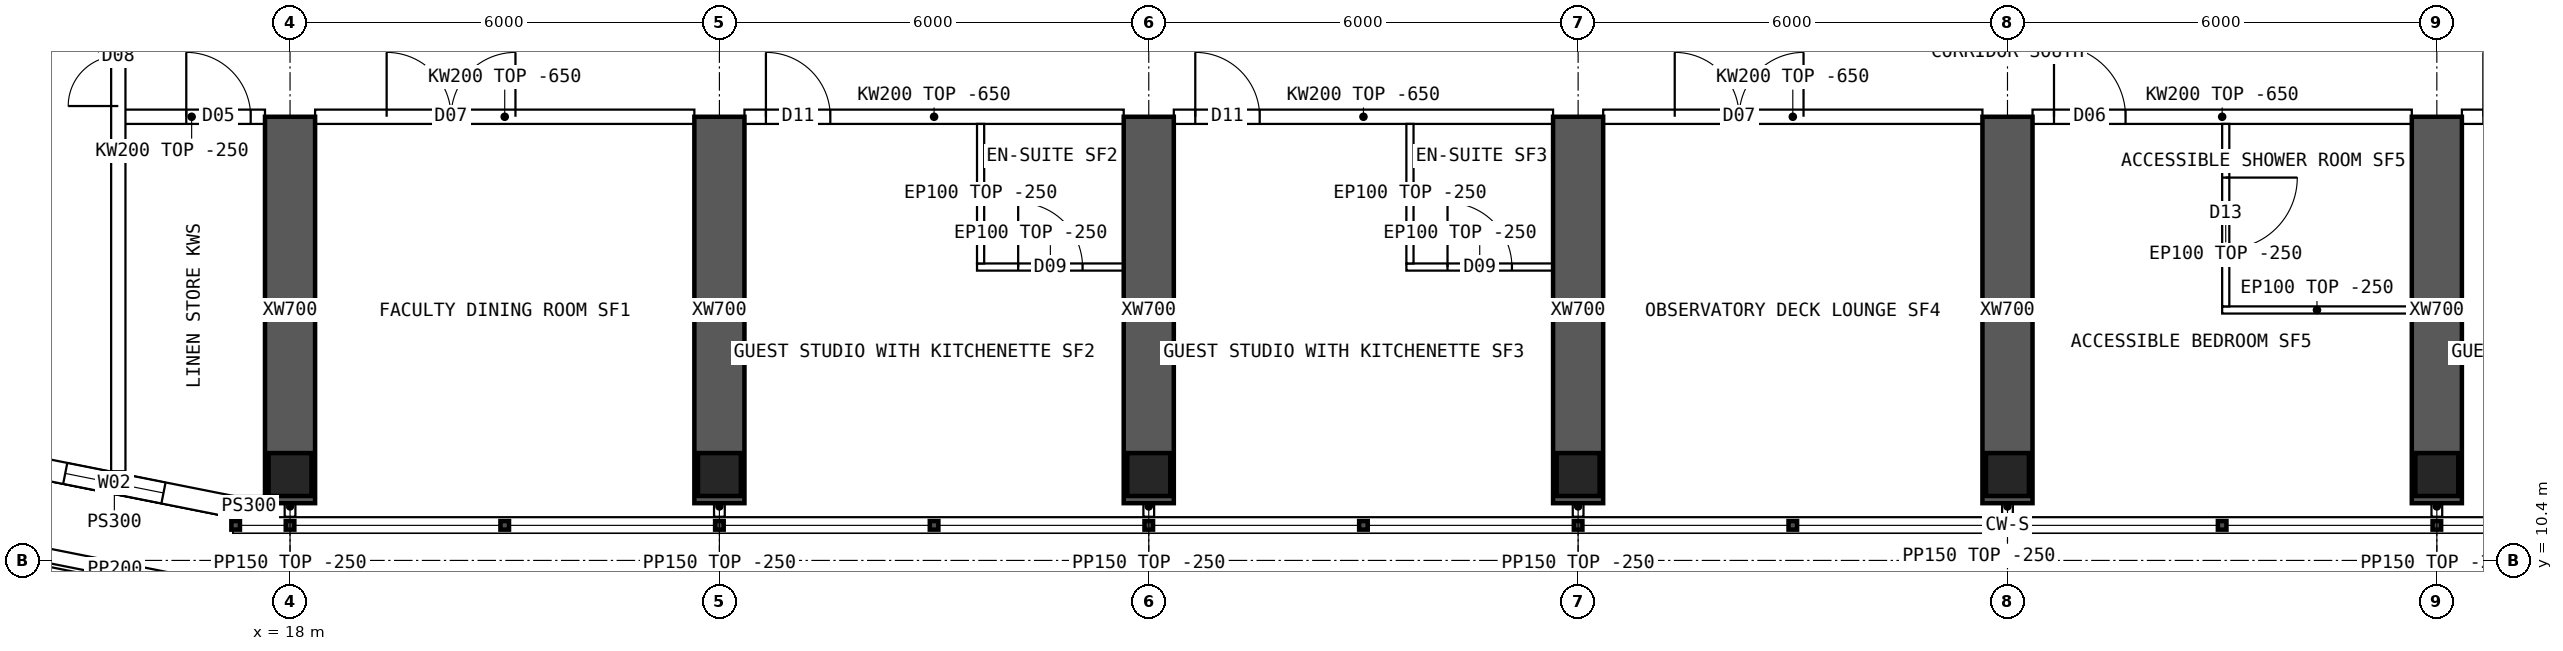
"""IFC4 building model, lengths in metres.
Left out: names, types, materials, properties, quantities, classifications, styles, units other than length and angle.
Written with IfcOpenShell. Run it as: python <this file> out.ifc"""

import sys

from ifc_helpers import new_model, si_unit, direction, frame, frame_2d, origin, origin_2d, place, context, subcontext, project, spatial, polyline, rectangle, hollow_rectangle, outline, extrude, element, fill, save


model = new_model("IFC4")
c1 = context("Model", 3, precision=1e-05, world=origin(), true_north=direction((0.0, 1.0)))
c2 = subcontext(c1, "Body", "Model", "MODEL_VIEW")
j1 = project(units=[si_unit("LENGTHUNIT", "METRE"), si_unit("PLANEANGLEUNIT", "RADIAN")], contexts=[c1])
p1 = place(None, origin())
s1 = spatial("IfcSite", under=j1, at=p1, CompositionType="ELEMENT")
p2 = place(p1, origin())
s2 = spatial("IfcBuilding", under=s1, at=p2, CompositionType="ELEMENT")
p3 = place(p2, frame((0.0, 0.0, 208.3)))
s3 = spatial("IfcBuildingStorey", under=s2, at=p3, CompositionType="ELEMENT", Elevation=208.3)
for number, where, z_axis, x_axis in (
    (1, (18.0, 11.6, 0.0), (0.0, 0.0, 1.0), (1.0, 0.0, 0.0)),
    (2, (24.0, 11.6, 0.0), (0.0, 0.0, 1.0), (1.0, 0.0, 0.0)),
    (3, (30.0, 11.6, 0.0), (0.0, 0.0, 1.0), (1.0, 0.0, 0.0)),
    (4, (36.0, 11.6, 0.0), (0.0, 0.0, 1.0), (1.0, 0.0, 0.0)),
    (5, (42.0, 11.6, 0.0), (0.0, 0.0, 1.0), (1.0, 0.0, 0.0)),
    (6, (48.0, 11.6, 0.0), (0.0, 0.0, 1.0), (1.0, 0.0, 0.0)),
):
    element("IfcColumn", number, at=place(p3, frame(where, z_axis=z_axis, x_axis=x_axis)), inside=s3, PredefinedType="COLUMN", context=c2, shape_type="SweptSolid", body=[
        extrude(hollow_rectangle(XDim=0.6, YDim=0.6, WallThickness=0.06, at=origin_2d()), origin(), (0.0, 0.0, 1.0), 4.5),
    ])
for number, where, z_axis, x_axis in (
    (7, (18.0, 11.2, 0.0), (0.0, 0.0, 1.0), (0.0, 1.0, 0.0)),
    (8, (24.0, 11.2, 0.0), (0.0, 0.0, 1.0), (0.0, 1.0, 0.0)),
    (9, (30.0, 11.2, 0.0), (0.0, 0.0, 1.0), (0.0, 1.0, 0.0)),
    (10, (36.0, 11.2, 0.0), (0.0, 0.0, 1.0), (0.0, 1.0, 0.0)),
    (11, (42.0, 11.2, 0.0), (0.0, 0.0, 1.0), (0.0, 1.0, 0.0)),
    (12, (48.0, 11.2, 0.0), (0.0, 0.0, 1.0), (0.0, 1.0, 0.0)),
):
    element("IfcWall", number, at=place(p3, frame(where, z_axis=z_axis, x_axis=x_axis)), inside=s3, PredefinedType="SHEAR", context=c2, shape_type="SweptSolid", body=[
        extrude(rectangle(XDim=5.4, YDim=0.7, at=frame_2d((2.7, 0.0))), origin(), (0.0, 0.0, 1.0), 4.5),
    ])
p4 = place(p3, frame((13.89, 11.808, 0.0), z_axis=(0.0, 0.0, 1.0), x_axis=(0.98078325777, -0.195100490205, 0.0)))
e13 = element("IfcWall", 13, at=p4, inside=s3, PredefinedType="SOLIDWALL", context=c2, shape_type="SweptSolid", body=[
    extrude(outline(polyline([(-0.03, -0.15), (3.405, -0.15), (3.345, 0.15), (0.03, 0.15), (-0.03, -0.15)])), origin(), (0.0, 0.0, 1.0), 4.25),
])
p5 = place(p4, frame((0.988, 0.0, 0.9)))
e14 = element("IfcOpeningElement", 14, at=p5, cuts=e13, PredefinedType="OPENING", context=c2, shape_type="SweptSolid", body=[
    extrude(rectangle(XDim=1.4, YDim=1.8, at=frame_2d((0.7, 0.9))), frame((0.0, 0.16, 0.0), z_axis=(0.0, -1.0, 0.0), x_axis=(1.0, 0.0, 0.0)), (0.0, 0.0, 1.0), 0.32),
])
p6 = place(p3, frame((17.2, 11.15, 0.0), z_axis=(0.0, 0.0, 1.0), x_axis=(1.0, 0.0, 0.0)))
e15 = element("IfcWall", 15, at=p6, inside=s3, PredefinedType="SOLIDWALL", context=c2, shape_type="SweptSolid", body=[
    extrude(rectangle(XDim=0.45, YDim=0.3, at=frame_2d((0.225, 0.0))), origin(), (0.0, 0.0, 1.0), 4.25),
])
p7 = place(p3, frame((17.215, 9.95, 0.0), z_axis=(0.0, 0.0, 1.0), x_axis=(-0.980787925163, 0.195077025438, 0.0)))
e16 = element("IfcWall", 16, at=p7, inside=s3, PredefinedType="PARAPET", context=c2, shape_type="SweptSolid", body=[
    extrude(rectangle(XDim=3.389, YDim=0.2, at=frame_2d((1.695, 0.0))), origin(), (0.0, 0.0, 1.0), 1.1),
])
p8 = place(p3, frame((15.6, 16.6, 0.0), z_axis=(0.0, 0.0, 1.0), x_axis=(1.0, 0.0, 0.0)))
e17 = element("IfcWall", 17, at=p8, inside=s3, PredefinedType="SOLIDWALL", context=c2, shape_type="SweptSolid", body=[
    extrude(rectangle(XDim=2.05, YDim=0.2, at=frame_2d((1.025, 0.0))), origin(), (0.0, 0.0, 1.0), 4.25),
])
p9 = place(p8, frame((0.95, 0.0, 0.0)))
e18 = element("IfcOpeningElement", 18, at=p9, cuts=e17, PredefinedType="OPENING", context=c2, shape_type="SweptSolid", body=[
    extrude(rectangle(XDim=0.9, YDim=2.1, at=frame_2d((0.45, 1.05))), frame((0.0, 0.11, 0.0), z_axis=(0.0, -1.0, 0.0), x_axis=(1.0, 0.0, 0.0)), (0.0, 0.0, 1.0), 0.22),
])
p10 = place(p3, frame((18.35, 16.6, 0.0), z_axis=(0.0, 0.0, 1.0), x_axis=(1.0, 0.0, 0.0)))
e19 = element("IfcWall", 19, at=p10, inside=s3, PredefinedType="SOLIDWALL", context=c2, shape_type="SweptSolid", body=[
    extrude(outline(polyline([(0.0, 0.0), (5.3, 0.0), (5.3, 3.85), (0.0, 3.85), (0.0, 0.0)])), frame((0.0, 0.1, 0.0), z_axis=(0.0, -1.0, 0.0), x_axis=(1.0, 0.0, 0.0)), (0.0, 0.0, 1.0), 0.2),
])
p11 = place(p10, frame((1.0, 0.0, 0.0)))
e20 = element("IfcOpeningElement", 20, at=p11, cuts=e19, PredefinedType="OPENING", context=c2, shape_type="SweptSolid", body=[
    extrude(rectangle(XDim=1.8, YDim=2.1, at=frame_2d((0.9, 1.05))), frame((0.0, 0.11, 0.0), z_axis=(0.0, -1.0, 0.0), x_axis=(1.0, 0.0, 0.0)), (0.0, 0.0, 1.0), 0.22),
])
p12 = place(p3, frame((24.35, 16.6, 0.0), z_axis=(0.0, 0.0, 1.0), x_axis=(1.0, 0.0, 0.0)))
e21 = element("IfcWall", 21, at=p12, inside=s3, PredefinedType="SOLIDWALL", context=c2, shape_type="SweptSolid", body=[
    extrude(outline(polyline([(0.0, 0.0), (5.3, 0.0), (5.3, 3.85), (0.0, 3.85), (0.0, 0.0)])), frame((0.0, 0.1, 0.0), z_axis=(0.0, -1.0, 0.0), x_axis=(1.0, 0.0, 0.0)), (0.0, 0.0, 1.0), 0.2),
])
p13 = place(p12, frame((0.3, 0.0, 0.0)))
e22 = element("IfcOpeningElement", 22, at=p13, cuts=e21, PredefinedType="OPENING", context=c2, shape_type="SweptSolid", body=[
    extrude(rectangle(XDim=0.9, YDim=2.1, at=frame_2d((0.45, 1.05))), frame((0.0, 0.11, 0.0), z_axis=(0.0, -1.0, 0.0), x_axis=(1.0, 0.0, 0.0)), (0.0, 0.0, 1.0), 0.22),
])
p14 = place(p3, frame((30.35, 16.6, 0.0), z_axis=(0.0, 0.0, 1.0), x_axis=(1.0, 0.0, 0.0)))
e23 = element("IfcWall", 23, at=p14, inside=s3, PredefinedType="SOLIDWALL", context=c2, shape_type="SweptSolid", body=[
    extrude(outline(polyline([(0.0, 0.0), (5.3, 0.0), (5.3, 3.85), (0.0, 3.85), (0.0, 0.0)])), frame((0.0, 0.1, 0.0), z_axis=(0.0, -1.0, 0.0), x_axis=(1.0, 0.0, 0.0)), (0.0, 0.0, 1.0), 0.2),
])
p15 = place(p14, frame((0.3, 0.0, 0.0)))
e24 = element("IfcOpeningElement", 24, at=p15, cuts=e23, PredefinedType="OPENING", context=c2, shape_type="SweptSolid", body=[
    extrude(rectangle(XDim=0.9, YDim=2.1, at=frame_2d((0.45, 1.05))), frame((0.0, 0.11, 0.0), z_axis=(0.0, -1.0, 0.0), x_axis=(1.0, 0.0, 0.0)), (0.0, 0.0, 1.0), 0.22),
])
p16 = place(p3, frame((36.35, 16.6, 0.0), z_axis=(0.0, 0.0, 1.0), x_axis=(1.0, 0.0, 0.0)))
e25 = element("IfcWall", 25, at=p16, inside=s3, PredefinedType="SOLIDWALL", context=c2, shape_type="SweptSolid", body=[
    extrude(outline(polyline([(0.0, 0.0), (5.3, 0.0), (5.3, 3.85), (0.0, 3.85), (0.0, 0.0)])), frame((0.0, 0.1, 0.0), z_axis=(0.0, -1.0, 0.0), x_axis=(1.0, 0.0, 0.0)), (0.0, 0.0, 1.0), 0.2),
])
p17 = place(p16, frame((1.0, 0.0, 0.0)))
e26 = element("IfcOpeningElement", 26, at=p17, cuts=e25, PredefinedType="OPENING", context=c2, shape_type="SweptSolid", body=[
    extrude(rectangle(XDim=1.8, YDim=2.1, at=frame_2d((0.9, 1.05))), frame((0.0, 0.11, 0.0), z_axis=(0.0, -1.0, 0.0), x_axis=(1.0, 0.0, 0.0)), (0.0, 0.0, 1.0), 0.22),
])
p18 = place(p3, frame((42.35, 16.6, 0.0), z_axis=(0.0, 0.0, 1.0), x_axis=(1.0, 0.0, 0.0)))
e27 = element("IfcWall", 27, at=p18, inside=s3, PredefinedType="SOLIDWALL", context=c2, shape_type="SweptSolid", body=[
    extrude(outline(polyline([(0.0, 0.0), (5.3, 0.0), (5.3, 3.85), (0.0, 3.85), (0.0, 0.0)])), frame((0.0, 0.1, 0.0), z_axis=(0.0, -1.0, 0.0), x_axis=(1.0, 0.0, 0.0)), (0.0, 0.0, 1.0), 0.2),
])
p19 = place(p18, frame((0.3, 0.0, 0.0)))
e28 = element("IfcOpeningElement", 28, at=p19, cuts=e27, PredefinedType="OPENING", context=c2, shape_type="SweptSolid", body=[
    extrude(rectangle(XDim=1.0, YDim=2.1, at=frame_2d((0.5, 1.05))), frame((0.0, 0.11, 0.0), z_axis=(0.0, -1.0, 0.0), x_axis=(1.0, 0.0, 0.0)), (0.0, 0.0, 1.0), 0.22),
])
p20 = place(p3, frame((48.35, 16.6, 0.0), z_axis=(0.0, 0.0, 1.0), x_axis=(1.0, 0.0, 0.0)))
e29 = element("IfcWall", 29, at=p20, inside=s3, PredefinedType="SOLIDWALL", context=c2, shape_type="SweptSolid", body=[
    extrude(outline(polyline([(0.0, 0.0), (5.3, 0.0), (5.3, 3.85), (0.0, 3.85), (0.0, 0.0)])), frame((0.0, 0.1, 0.0), z_axis=(0.0, -1.0, 0.0), x_axis=(1.0, 0.0, 0.0)), (0.0, 0.0, 1.0), 0.2),
])
p21 = place(p20, frame((0.3, 0.0, 0.0)))
e30 = element("IfcOpeningElement", 30, at=p21, cuts=e29, PredefinedType="OPENING", context=c2, shape_type="SweptSolid", body=[
    extrude(rectangle(XDim=0.9, YDim=2.1, at=frame_2d((0.45, 1.05))), frame((0.0, 0.11, 0.0), z_axis=(0.0, -1.0, 0.0), x_axis=(1.0, 0.0, 0.0)), (0.0, 0.0, 1.0), 0.22),
])
p22 = place(p3, frame((29.65, 14.5, 0.0), z_axis=(0.0, 0.0, 1.0), x_axis=(-1.0, 0.0, 0.0)))
e31 = element("IfcWall", 31, at=p22, inside=s3, PredefinedType="PARTITIONING", context=c2, shape_type="SweptSolid", body=[
    extrude(rectangle(XDim=2.05, YDim=0.1, at=frame_2d((1.025, 0.0))), origin(), (0.0, 0.0, 1.0), 4.25),
])
p23 = place(p22, frame((0.575, 0.0, 0.0)))
e32 = element("IfcOpeningElement", 32, at=p23, cuts=e31, PredefinedType="OPENING", context=c2, shape_type="SweptSolid", body=[
    extrude(rectangle(XDim=0.9, YDim=2.1, at=frame_2d((0.45, 1.05))), frame((0.0, 0.06, 0.0), z_axis=(0.0, -1.0, 0.0), x_axis=(1.0, 0.0, 0.0)), (0.0, 0.0, 1.0), 0.12),
])
p24 = place(p3, frame((27.65, 14.55, 0.0), z_axis=(0.0, 0.0, 1.0), x_axis=(0.0, 1.0, 0.0)))
e33 = element("IfcWall", 33, at=p24, inside=s3, PredefinedType="PARTITIONING", context=c2, shape_type="SweptSolid", body=[
    extrude(outline(polyline([(0.0, 0.0), (1.95, 0.0), (1.95, 3.85), (1.902, 3.85), (1.9, 4.25), (0.0, 4.25), (0.0, 0.0)])), frame((0.0, 0.05, 0.0), z_axis=(0.0, -1.0, 0.0), x_axis=(1.0, 0.0, 0.0)), (0.0, 0.0, 1.0), 0.1),
])
p25 = place(p3, frame((35.65, 14.5, 0.0), z_axis=(0.0, 0.0, 1.0), x_axis=(-1.0, 0.0, 0.0)))
e34 = element("IfcWall", 34, at=p25, inside=s3, PredefinedType="PARTITIONING", context=c2, shape_type="SweptSolid", body=[
    extrude(rectangle(XDim=2.05, YDim=0.1, at=frame_2d((1.025, 0.0))), origin(), (0.0, 0.0, 1.0), 4.25),
])
p26 = place(p25, frame((0.575, 0.0, 0.0)))
e35 = element("IfcOpeningElement", 35, at=p26, cuts=e34, PredefinedType="OPENING", context=c2, shape_type="SweptSolid", body=[
    extrude(rectangle(XDim=0.9, YDim=2.1, at=frame_2d((0.45, 1.05))), frame((0.0, 0.06, 0.0), z_axis=(0.0, -1.0, 0.0), x_axis=(1.0, 0.0, 0.0)), (0.0, 0.0, 1.0), 0.12),
])
p27 = place(p3, frame((33.65, 14.55, 0.0), z_axis=(0.0, 0.0, 1.0), x_axis=(0.0, 1.0, 0.0)))
e36 = element("IfcWall", 36, at=p27, inside=s3, PredefinedType="PARTITIONING", context=c2, shape_type="SweptSolid", body=[
    extrude(outline(polyline([(0.0, 0.0), (1.95, 0.0), (1.95, 3.85), (1.902, 3.85), (1.9, 4.25), (0.0, 4.25), (0.0, 0.0)])), frame((0.0, 0.05, 0.0), z_axis=(0.0, -1.0, 0.0), x_axis=(1.0, 0.0, 0.0)), (0.0, 0.0, 1.0), 0.1),
])
p28 = place(p3, frame((45.0, 13.9, 0.0), z_axis=(0.0, 0.0, 1.0), x_axis=(1.0, 0.0, 0.0)))
e37 = element("IfcWall", 37, at=p28, inside=s3, PredefinedType="PARTITIONING", context=c2, shape_type="SweptSolid", body=[
    extrude(rectangle(XDim=2.65, YDim=0.1, at=frame_2d((1.325, 0.0))), origin(), (0.0, 0.0, 1.0), 4.25),
])
p29 = place(p3, frame((45.05, 13.95, 0.0), z_axis=(0.0, 0.0, 1.0), x_axis=(0.0, 1.0, 0.0)))
e38 = element("IfcWall", 38, at=p29, inside=s3, PredefinedType="PARTITIONING", context=c2, shape_type="SweptSolid", body=[
    extrude(outline(polyline([(0.0, 0.0), (2.55, 0.0), (2.55, 3.85), (2.502, 3.85), (2.5, 4.25), (0.0, 4.25), (0.0, 0.0)])), frame((0.0, 0.05, 0.0), z_axis=(0.0, -1.0, 0.0), x_axis=(1.0, 0.0, 0.0)), (0.0, 0.0, 1.0), 0.1),
])
p30 = place(p29, frame((0.8, 0.0, 0.0)))
e39 = element("IfcOpeningElement", 39, at=p30, cuts=e38, PredefinedType="OPENING", context=c2, shape_type="SweptSolid", body=[
    extrude(rectangle(XDim=1.0, YDim=2.1, at=frame_2d((0.5, 1.05))), frame((0.0, 0.06, 0.0), z_axis=(0.0, -1.0, 0.0), x_axis=(1.0, 0.0, 0.0)), (0.0, 0.0, 1.0), 0.12),
])
p31 = place(p3, frame((15.6, 11.646, 0.0), z_axis=(0.0, 0.0, 1.0), x_axis=(0.0, 1.0, 0.0)))
e40 = element("IfcWall", 40, at=p31, inside=s3, PredefinedType="SOLIDWALL", context=c2, shape_type="SweptSolid", body=[
    extrude(rectangle(XDim=40.708, YDim=0.2, at=frame_2d((20.354, 0.0))), origin(), (0.0, 0.0, 1.0), 4.25),
])
p32 = place(p31, frame((13.434, 0.0, 0.0)))
e41 = element("IfcOpeningElement", 41, at=p32, cuts=e40, PredefinedType="OPENING", context=c2, shape_type="SweptSolid", body=[
    extrude(rectangle(XDim=1.2, YDim=2.1, at=frame_2d((0.6, 1.05))), frame((0.0, 0.11, 0.0), z_axis=(0.0, -1.0, 0.0), x_axis=(1.0, 0.0, 0.0)), (0.0, 0.0, 1.0), 0.22),
])
p33 = place(p31, frame((21.194, 0.0, 0.0)))
e42 = element("IfcOpeningElement", 42, at=p33, cuts=e40, PredefinedType="OPENING", context=c2, shape_type="SweptSolid", body=[
    extrude(rectangle(XDim=1.2, YDim=2.1, at=frame_2d((0.6, 1.05))), frame((0.0, 0.11, 0.0), z_axis=(0.0, -1.0, 0.0), x_axis=(1.0, 0.0, 0.0)), (0.0, 0.0, 1.0), 0.22),
])
p34 = place(p31, frame((5.104, 0.0, 0.0)))
e43 = element("IfcOpeningElement", 43, at=p34, cuts=e40, PredefinedType="OPENING", context=c2, shape_type="SweptSolid", body=[
    extrude(rectangle(XDim=1.4, YDim=2.1, at=frame_2d((0.7, 1.05))), frame((0.0, 0.11, 0.0), z_axis=(0.0, -1.0, 0.0), x_axis=(1.0, 0.0, 0.0)), (0.0, 0.0, 1.0), 0.22),
])
p35 = place(p31, frame((34.104, 0.0, 0.0)))
e44 = element("IfcOpeningElement", 44, at=p35, cuts=e40, PredefinedType="OPENING", context=c2, shape_type="SweptSolid", body=[
    extrude(rectangle(XDim=1.4, YDim=2.1, at=frame_2d((0.7, 1.05))), frame((0.0, 0.11, 0.0), z_axis=(0.0, -1.0, 0.0), x_axis=(1.0, 0.0, 0.0)), (0.0, 0.0, 1.0), 0.22),
])
for number, where, z_axis, x_axis in (
    (45, (18.0, 11.3, 0.0), (0.0, 0.0, 1.0), (0.0, -1.0, 0.0)),
    (46, (24.0, 11.3, 0.0), (0.0, 0.0, 1.0), (0.0, -1.0, 0.0)),
    (47, (30.0, 11.3, 0.0), (0.0, 0.0, 1.0), (0.0, -1.0, 0.0)),
    (48, (36.0, 11.3, 0.0), (0.0, 0.0, 1.0), (0.0, -1.0, 0.0)),
    (49, (42.0, 11.3, 0.0), (0.0, 0.0, 1.0), (0.0, -1.0, 0.0)),
    (50, (48.0, 11.3, 0.0), (0.0, 0.0, 1.0), (0.0, -1.0, 0.0)),
):
    element("IfcWall", number, at=place(p3, frame(where, z_axis=z_axis, x_axis=x_axis)), inside=s3, PredefinedType="PARTITIONING", context=c2, shape_type="SweptSolid", body=[
        extrude(rectangle(XDim=0.29, YDim=0.15, at=frame_2d((0.145, 0.0))), origin(), (0.0, 0.0, 1.0), 4.25),
    ])
p36 = place(p5, origin())
e51 = element("IfcWindow", 51, at=p36, inside=s3, PartitioningType="SINGLE_PANEL", PredefinedType="WINDOW", context=c2, shape_type="SweptSolid", body=[
    extrude(rectangle(XDim=1.4, YDim=1.8, at=frame_2d((0.7, 0.9))), frame((0.0, 0.03, 0.0), z_axis=(0.0, -1.0, 0.0), x_axis=(1.0, 0.0, 0.0)), (0.0, 0.0, 1.0), 0.06),
])
fill(e14, e51)
p37 = place(p11, origin())
e52 = element("IfcDoor", 52, at=p37, inside=s3, OperationType="DOUBLE_DOOR_SINGLE_SWING", PredefinedType="DOOR", context=c2, shape_type="SweptSolid", body=[
    extrude(rectangle(XDim=1.8, YDim=2.1, at=frame_2d((0.9, 1.05))), frame((0.0, 0.025, 0.0), z_axis=(0.0, -1.0, 0.0), x_axis=(1.0, 0.0, 0.0)), (0.0, 0.0, 1.0), 0.05),
])
fill(e20, e52)
p38 = place(p23, origin())
e53 = element("IfcDoor", 53, at=p38, inside=s3, OperationType="SINGLE_SWING_RIGHT", PredefinedType="DOOR", context=c2, shape_type="SweptSolid", body=[
    extrude(rectangle(XDim=0.9, YDim=2.1, at=frame_2d((0.45, 1.05))), frame((0.0, 0.025, 0.0), z_axis=(0.0, -1.0, 0.0), x_axis=(1.0, 0.0, 0.0)), (0.0, 0.0, 1.0), 0.05),
])
fill(e32, e53)
p39 = place(p13, origin())
e54 = element("IfcDoor", 54, at=p39, inside=s3, OperationType="SINGLE_SWING_LEFT", PredefinedType="DOOR", context=c2, shape_type="SweptSolid", body=[
    extrude(rectangle(XDim=0.9, YDim=2.1, at=frame_2d((0.45, 1.05))), frame((0.0, 0.025, 0.0), z_axis=(0.0, -1.0, 0.0), x_axis=(1.0, 0.0, 0.0)), (0.0, 0.0, 1.0), 0.05),
])
fill(e22, e54)
p40 = place(p26, origin())
e55 = element("IfcDoor", 55, at=p40, inside=s3, OperationType="SINGLE_SWING_RIGHT", PredefinedType="DOOR", context=c2, shape_type="SweptSolid", body=[
    extrude(rectangle(XDim=0.9, YDim=2.1, at=frame_2d((0.45, 1.05))), frame((0.0, 0.025, 0.0), z_axis=(0.0, -1.0, 0.0), x_axis=(1.0, 0.0, 0.0)), (0.0, 0.0, 1.0), 0.05),
])
fill(e35, e55)
p41 = place(p15, origin())
e56 = element("IfcDoor", 56, at=p41, inside=s3, OperationType="SINGLE_SWING_LEFT", PredefinedType="DOOR", context=c2, shape_type="SweptSolid", body=[
    extrude(rectangle(XDim=0.9, YDim=2.1, at=frame_2d((0.45, 1.05))), frame((0.0, 0.025, 0.0), z_axis=(0.0, -1.0, 0.0), x_axis=(1.0, 0.0, 0.0)), (0.0, 0.0, 1.0), 0.05),
])
fill(e24, e56)
p42 = place(p17, origin())
e57 = element("IfcDoor", 57, at=p42, inside=s3, OperationType="DOUBLE_DOOR_SINGLE_SWING", PredefinedType="DOOR", context=c2, shape_type="SweptSolid", body=[
    extrude(rectangle(XDim=1.8, YDim=2.1, at=frame_2d((0.9, 1.05))), frame((0.0, 0.025, 0.0), z_axis=(0.0, -1.0, 0.0), x_axis=(1.0, 0.0, 0.0)), (0.0, 0.0, 1.0), 0.05),
])
fill(e26, e57)
p43 = place(p30, origin())
e58 = element("IfcDoor", 58, at=p43, inside=s3, OperationType="SINGLE_SWING_RIGHT", PredefinedType="DOOR", context=c2, shape_type="SweptSolid", body=[
    extrude(rectangle(XDim=1.0, YDim=2.1, at=frame_2d((0.5, 1.05))), frame((0.0, 0.025, 0.0), z_axis=(0.0, -1.0, 0.0), x_axis=(1.0, 0.0, 0.0)), (0.0, 0.0, 1.0), 0.05),
])
fill(e39, e58)
p44 = place(p19, origin())
e59 = element("IfcDoor", 59, at=p44, inside=s3, OperationType="SINGLE_SWING_LEFT", PredefinedType="DOOR", context=c2, shape_type="SweptSolid", body=[
    extrude(rectangle(XDim=1.0, YDim=2.1, at=frame_2d((0.5, 1.05))), frame((0.0, 0.025, 0.0), z_axis=(0.0, -1.0, 0.0), x_axis=(1.0, 0.0, 0.0)), (0.0, 0.0, 1.0), 0.05),
])
fill(e28, e59)
p45 = place(p34, origin())
e60 = element("IfcDoor", 60, at=p45, inside=s3, OperationType="DOUBLE_DOOR_SINGLE_SWING", PredefinedType="DOOR", context=c2, shape_type="SweptSolid", body=[
    extrude(rectangle(XDim=1.4, YDim=2.1, at=frame_2d((0.7, 1.05))), frame((0.0, 0.025, 0.0), z_axis=(0.0, -1.0, 0.0), x_axis=(1.0, 0.0, 0.0)), (0.0, 0.0, 1.0), 0.05),
])
fill(e43, e60)
p46 = place(p9, origin())
e61 = element("IfcDoor", 61, at=p46, inside=s3, OperationType="SINGLE_SWING_LEFT", PredefinedType="DOOR", context=c2, shape_type="SweptSolid", body=[
    extrude(rectangle(XDim=0.9, YDim=2.1, at=frame_2d((0.45, 1.05))), frame((0.0, 0.025, 0.0), z_axis=(0.0, -1.0, 0.0), x_axis=(1.0, 0.0, 0.0)), (0.0, 0.0, 1.0), 0.05),
])
fill(e18, e61)
save(model, sys.argv[1])
